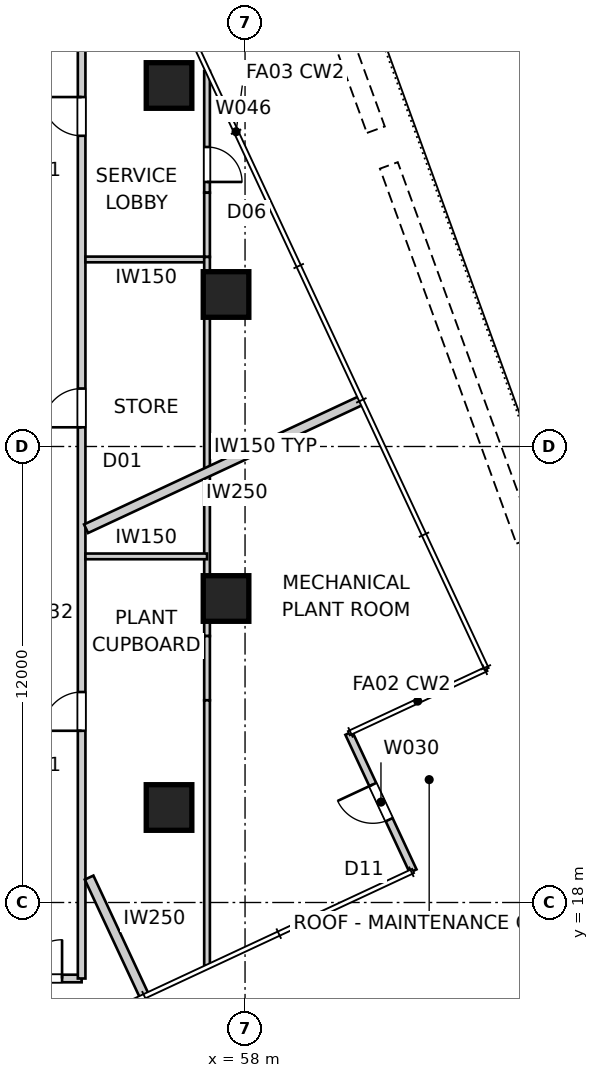
"""IFC4 building model, lengths in metres.
Left out: names, types, materials, properties, quantities, classifications, styles, units other than length and angle.
Written with IfcOpenShell. Run it as: python <this file> out.ifc"""

import sys

from ifc_helpers import new_model, si_unit, direction, frame, frame_2d, origin, origin_2d, place, context, subcontext, project, spatial, rectangle, extrude, element, fill, save


model = new_model("IFC4")
c1 = context("Model", 3, precision=1e-05, world=origin(), true_north=direction((0.0, 1.0)))
c2 = subcontext(c1, "Body", "Model", "MODEL_VIEW")
j1 = project(units=[si_unit("LENGTHUNIT", "METRE"), si_unit("PLANEANGLEUNIT", "RADIAN")], contexts=[c1])
p1 = place(None, origin())
s1 = spatial("IfcSite", under=j1, at=p1, CompositionType="ELEMENT")
p2 = place(p1, origin())
s2 = spatial("IfcBuilding", under=s1, at=p2, CompositionType="ELEMENT")
p3 = place(p2, frame((0.0, 0.0, 171.0)))
s3 = spatial("IfcBuildingStorey", under=s2, at=p3, CompositionType="ELEMENT", Elevation=171.0)
for number, where, z_axis, x_axis in (
    (1, (57.5, 26.0, 0.0), (0.0, 0.0, 1.0), (1.0, 0.0, 0.0)),
    (2, (57.5, 34.0, 0.0), (0.0, 0.0, 1.0), (1.0, 0.0, 0.0)),
    (3, (56.0, 39.5, 0.0), (0.0, 0.0, 1.0), (1.0, 0.0, 0.0)),
    (4, (56.0, 20.5, 0.0), (0.0, 0.0, 1.0), (1.0, 0.0, 0.0)),
):
    element("IfcColumn", number, at=place(p3, frame(where, z_axis=z_axis, x_axis=x_axis)), inside=s3, PredefinedType="COLUMN", context=c2, shape_type="SweptSolid", body=[
        extrude(rectangle(XDim=1.2, YDim=1.2, at=origin_2d()), origin(), (0.0, 0.0, 1.0), 5.0),
    ])
p4 = place(p3, frame((62.422, 18.829, 0.0), z_axis=(0.0, 0.0, 1.0), x_axis=(-0.422608113797, 0.906312519031, 0.0)))
e5 = element("IfcWall", 5, at=p4, inside=s3, PredefinedType="SOLIDWALL", context=c2, shape_type="SweptSolid", body=[
    extrude(rectangle(XDim=4.0, YDim=0.2, at=frame_2d((2.0, 0.0))), origin(), (0.0, 0.0, 1.0), 4.85),
])
p5 = place(p4, frame((1.49, 0.0, 0.0)))
e6 = element("IfcOpeningElement", 6, at=p5, cuts=e5, PredefinedType="OPENING", context=c2, shape_type="SweptSolid", body=[
    extrude(rectangle(XDim=1.02, YDim=2.1, at=frame_2d((0.51, 1.05))), frame((0.0, 0.11, 0.0), z_axis=(0.0, -1.0, 0.0), x_axis=(1.0, 0.0, 0.0)), (0.0, 0.0, 1.0), 0.22),
])
p6 = place(p3, frame((26.3, 16.0, 0.0), z_axis=(0.0, 0.0, 1.0), x_axis=(1.0, 0.0, 0.0)))
e7 = element("IfcWall", 7, at=p6, inside=s3, PredefinedType="PARTITIONING", context=c2, shape_type="SweptSolid", body=[
    extrude(rectangle(XDim=27.4, YDim=0.2, at=frame_2d((13.7, 0.0))), origin(), (0.0, 0.0, 1.0), 4.85),
])
p7 = place(p6, frame((18.802, 0.0, 0.0)))
e8 = element("IfcOpeningElement", 8, at=p7, cuts=e7, PredefinedType="OPENING", context=c2, shape_type="SweptSolid", body=[
    extrude(rectangle(XDim=1.02, YDim=2.34, at=frame_2d((0.51, 1.17))), frame((0.0, 0.11, 0.0), z_axis=(0.0, -1.0, 0.0), x_axis=(1.0, 0.0, 0.0)), (0.0, 0.0, 1.0), 0.22),
])
p8 = place(p6, frame((13.527, 0.0, 0.0)))
e9 = element("IfcOpeningElement", 9, at=p8, cuts=e7, PredefinedType="OPENING", context=c2, shape_type="SweptSolid", body=[
    extrude(rectangle(XDim=1.02, YDim=2.34, at=frame_2d((0.51, 1.17))), frame((0.0, 0.11, 0.0), z_axis=(0.0, -1.0, 0.0), x_axis=(1.0, 0.0, 0.0)), (0.0, 0.0, 1.0), 0.22),
])
p9 = place(p6, frame((25.865, 0.0, 0.0)))
e10 = element("IfcOpeningElement", 10, at=p9, cuts=e7, PredefinedType="OPENING", context=c2, shape_type="SweptSolid", body=[
    extrude(rectangle(XDim=1.02, YDim=2.34, at=frame_2d((0.51, 1.17))), frame((0.0, 0.11, 0.0), z_axis=(0.0, -1.0, 0.0), x_axis=(1.0, 0.0, 0.0)), (0.0, 0.0, 1.0), 0.22),
])
p10 = place(p3, frame((53.7, 16.0, 0.0), z_axis=(0.0, 0.0, 1.0), x_axis=(0.0, 1.0, 0.0)))
e11 = element("IfcWall", 11, at=p10, inside=s3, PredefinedType="PARTITIONING", context=c2, shape_type="SweptSolid", body=[
    extrude(rectangle(XDim=27.7, YDim=0.2, at=frame_2d((13.85, 0.0))), origin(), (0.0, 0.0, 1.0), 4.85),
])
p11 = place(p10, frame((22.176, 0.0, 0.0)))
e12 = element("IfcOpeningElement", 12, at=p11, cuts=e11, PredefinedType="OPENING", context=c2, shape_type="SweptSolid", body=[
    extrude(rectangle(XDim=1.02, YDim=2.34, at=frame_2d((0.51, 1.17))), frame((0.0, 0.11, 0.0), z_axis=(0.0, -1.0, 0.0), x_axis=(1.0, 0.0, 0.0)), (0.0, 0.0, 1.0), 0.22),
])
p12 = place(p10, frame((6.519, 0.0, 0.0)))
e13 = element("IfcOpeningElement", 13, at=p12, cuts=e11, PredefinedType="OPENING", context=c2, shape_type="SweptSolid", body=[
    extrude(rectangle(XDim=1.02, YDim=2.34, at=frame_2d((0.51, 1.17))), frame((0.0, 0.11, 0.0), z_axis=(0.0, -1.0, 0.0), x_axis=(1.0, 0.0, 0.0)), (0.0, 0.0, 1.0), 0.22),
])
p13 = place(p10, frame((14.505, 0.0, 0.0)))
e14 = element("IfcOpeningElement", 14, at=p13, cuts=e11, PredefinedType="OPENING", context=c2, shape_type="SweptSolid", body=[
    extrude(rectangle(XDim=1.02, YDim=2.34, at=frame_2d((0.51, 1.17))), frame((0.0, 0.11, 0.0), z_axis=(0.0, -1.0, 0.0), x_axis=(1.0, 0.0, 0.0)), (0.0, 0.0, 1.0), 0.22),
])
p14 = place(p3, frame((55.353, 15.533, 0.0), z_axis=(0.0, 0.0, 1.0), x_axis=(-0.422586759932, 0.906322475905, 0.0)))
e15 = element("IfcWall", 15, at=p14, inside=s3, PredefinedType="PARTITIONING", context=c2, shape_type="SweptSolid", body=[
    extrude(rectangle(XDim=3.446, YDim=0.25, at=frame_2d((1.723, 0.0))), origin(), (0.0, 0.0, 1.0), 4.85),
])
p15 = place(p3, frame((61.06, 31.214, 0.0), z_axis=(0.0, 0.0, 1.0), x_axis=(-0.906306405344, -0.422621224778, 0.0)))
e16 = element("IfcWall", 16, at=p15, inside=s3, PredefinedType="PARTITIONING", context=c2, shape_type="SweptSolid", body=[
    extrude(rectangle(XDim=7.992, YDim=0.25, at=frame_2d((3.996, 0.0))), origin(), (0.0, 0.0, 1.0), 4.85),
])
p16 = place(p3, frame((57.0, 34.922, 0.0), z_axis=(0.0, 0.0, 1.0), x_axis=(-1.0, 0.0, 0.0)))
e17 = element("IfcWall", 17, at=p16, inside=s3, PredefinedType="SOLIDWALL", context=c2, shape_type="SweptSolid", body=[
    extrude(rectangle(XDim=3.2, YDim=0.15, at=frame_2d((1.6, 0.0))), origin(), (0.0, 0.0, 1.0), 4.85),
])
p17 = place(p3, frame((57.0, 39.881, 0.0), z_axis=(0.0, 0.0, 1.0), x_axis=(0.0, -1.0, 0.0)))
e18 = element("IfcWall", 18, at=p17, inside=s3, PredefinedType="SOLIDWALL", context=c2, shape_type="SweptSolid", body=[
    extrude(rectangle(XDim=3.202, YDim=0.15, at=frame_2d((1.601, 0.0))), origin(), (0.0, 0.0, 1.0), 4.85),
])
p18 = place(p17, frame((2.0, 0.0, 0.0)))
e19 = element("IfcOpeningElement", 19, at=p18, cuts=e18, PredefinedType="OPENING", context=c2, shape_type="SweptSolid", body=[
    extrude(rectangle(XDim=0.92, YDim=2.1, at=frame_2d((0.46, 1.05))), frame((0.0, 0.085, 0.0), z_axis=(0.0, -1.0, 0.0), x_axis=(1.0, 0.0, 0.0)), (0.0, 0.0, 1.0), 0.17),
])
p19 = place(p3, frame((57.0, 36.678, 0.0), z_axis=(0.0, 0.0, 1.0), x_axis=(0.0, -1.0, 0.0)))
e20 = element("IfcWall", 20, at=p19, inside=s3, PredefinedType="SOLIDWALL", context=c2, shape_type="SweptSolid", body=[
    extrude(rectangle(XDim=1.69, YDim=0.15, at=frame_2d((0.845, 0.0))), origin(), (0.0, 0.0, 1.0), 3.85),
])
p20 = place(p3, frame((57.0, 34.988, 0.0), z_axis=(0.0, 0.0, 1.0), x_axis=(0.0, -1.0, 0.0)))
e21 = element("IfcWall", 21, at=p20, inside=s3, PredefinedType="SOLIDWALL", context=c2, shape_type="SweptSolid", body=[
    extrude(rectangle(XDim=9.977, YDim=0.15, at=frame_2d((4.988, 0.0))), origin(), (0.0, 0.0, 1.0), 4.85),
])
p21 = place(p3, frame((57.0, 25.012, 0.0), z_axis=(0.0, 0.0, 1.0), x_axis=(0.0, -1.0, 0.0)))
e22 = element("IfcWall", 22, at=p21, inside=s3, PredefinedType="SOLIDWALL", context=c2, shape_type="SweptSolid", body=[
    extrude(rectangle(XDim=1.69, YDim=0.15, at=frame_2d((0.845, 0.0))), origin(), (0.0, 0.0, 1.0), 3.85),
])
p22 = place(p3, frame((57.0, 23.322, 0.0), z_axis=(0.0, 0.0, 1.0), x_axis=(0.0, -1.0, 0.0)))
e23 = element("IfcWall", 23, at=p22, inside=s3, PredefinedType="SOLIDWALL", context=c2, shape_type="SweptSolid", body=[
    extrude(rectangle(XDim=6.976, YDim=0.15, at=frame_2d((3.488, 0.0))), origin(), (0.0, 0.0, 1.0), 4.85),
])
p23 = place(p3, frame((53.8, 27.108, 0.0), z_axis=(0.0, 0.0, 1.0), x_axis=(1.0, 0.0, 0.0)))
e24 = element("IfcWall", 24, at=p23, inside=s3, PredefinedType="SOLIDWALL", context=c2, shape_type="SweptSolid", body=[
    extrude(rectangle(XDim=3.2, YDim=0.15, at=frame_2d((1.6, 0.0))), origin(), (0.0, 0.0, 1.0), 4.322),
])
p24 = place(p5, origin())
e25 = element("IfcDoor", 25, at=p24, inside=s3, OperationType="SINGLE_SWING_RIGHT", PredefinedType="DOOR", context=c2, shape_type="SweptSolid", body=[
    extrude(rectangle(XDim=1.02, YDim=2.1, at=frame_2d((0.51, 1.05))), frame((0.0, 0.025, 0.0), z_axis=(0.0, -1.0, 0.0), x_axis=(1.0, 0.0, 0.0)), (0.0, 0.0, 1.0), 0.05),
])
fill(e6, e25)
p25 = place(p11, origin())
e26 = element("IfcDoor", 26, at=p25, inside=s3, OperationType="SINGLE_SWING_RIGHT", PredefinedType="DOOR", context=c2, shape_type="SweptSolid", body=[
    extrude(rectangle(XDim=1.02, YDim=2.34, at=frame_2d((0.51, 1.17))), frame((0.0, 0.025, 0.0), z_axis=(0.0, -1.0, 0.0), x_axis=(1.0, 0.0, 0.0)), (0.0, 0.0, 1.0), 0.05),
])
fill(e12, e26)
p26 = place(p12, origin())
e27 = element("IfcDoor", 27, at=p26, inside=s3, OperationType="SINGLE_SWING_LEFT", PredefinedType="DOOR", context=c2, shape_type="SweptSolid", body=[
    extrude(rectangle(XDim=1.02, YDim=2.34, at=frame_2d((0.51, 1.17))), frame((0.0, 0.025, 0.0), z_axis=(0.0, -1.0, 0.0), x_axis=(1.0, 0.0, 0.0)), (0.0, 0.0, 1.0), 0.05),
])
fill(e13, e27)
p27 = place(p13, origin())
e28 = element("IfcDoor", 28, at=p27, inside=s3, OperationType="SINGLE_SWING_LEFT", PredefinedType="DOOR", context=c2, shape_type="SweptSolid", body=[
    extrude(rectangle(XDim=1.02, YDim=2.34, at=frame_2d((0.51, 1.17))), frame((0.0, 0.025, 0.0), z_axis=(0.0, -1.0, 0.0), x_axis=(1.0, 0.0, 0.0)), (0.0, 0.0, 1.0), 0.05),
])
fill(e14, e28)
p28 = place(p9, origin())
e29 = element("IfcDoor", 29, at=p28, inside=s3, OperationType="SINGLE_SWING_RIGHT", PredefinedType="DOOR", context=c2, shape_type="SweptSolid", body=[
    extrude(rectangle(XDim=1.02, YDim=2.34, at=frame_2d((0.51, 1.17))), frame((0.0, 0.025, 0.0), z_axis=(0.0, -1.0, 0.0), x_axis=(1.0, 0.0, 0.0)), (0.0, 0.0, 1.0), 0.05),
])
fill(e10, e29)
p29 = place(p18, origin())
e30 = element("IfcDoor", 30, at=p29, inside=s3, OperationType="SINGLE_SWING_RIGHT", PredefinedType="DOOR", context=c2, shape_type="SweptSolid", body=[
    extrude(rectangle(XDim=0.92, YDim=2.1, at=frame_2d((0.46, 1.05))), frame((0.0, 0.025, 0.0), z_axis=(0.0, -1.0, 0.0), x_axis=(1.0, 0.0, 0.0)), (0.0, 0.0, 1.0), 0.05),
])
fill(e19, e30)
save(model, sys.argv[1])
